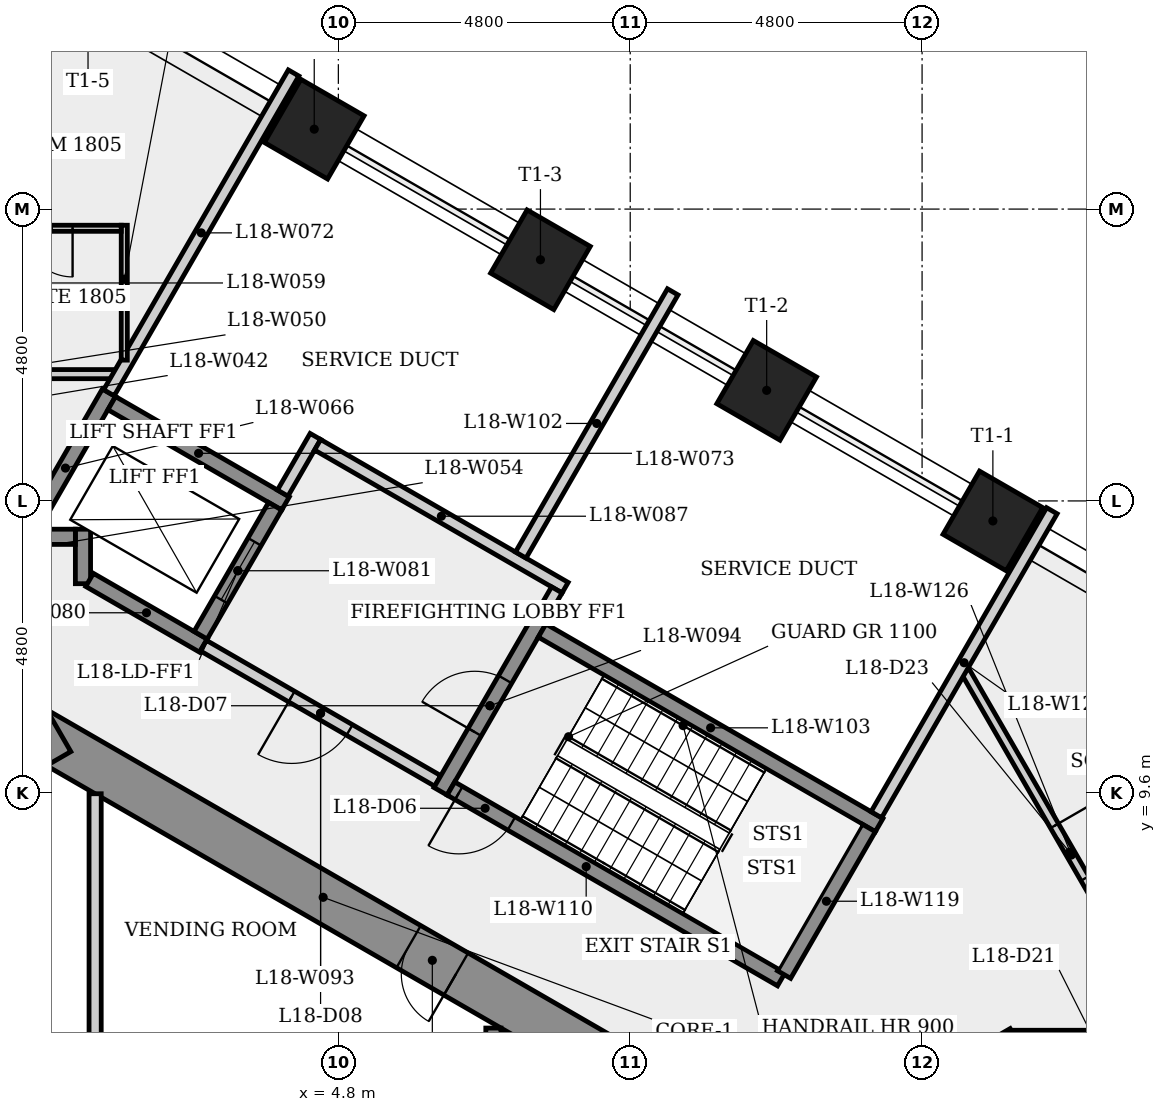
"""IFC4 building model, lengths in metres.
Left out: names, types, materials, properties, quantities, classifications, styles, units other than length and angle.
Written with IfcOpenShell. Run it as: python <this file> out.ifc"""

import sys

from ifc_helpers import new_model, si_unit, direction, frame, frame_2d, origin, origin_2d, place, context, subcontext, project, spatial, rectangle, extrude, element, fill, save


model = new_model("IFC4")
c1 = context("Model", 3, precision=1e-05, world=origin(), true_north=direction((0.0, 1.0)))
c2 = subcontext(c1, "Body", "Model", "MODEL_VIEW")
j1 = project(units=[si_unit("LENGTHUNIT", "METRE"), si_unit("PLANEANGLEUNIT", "RADIAN")], contexts=[c1])
p1 = place(None, origin())
s1 = spatial("IfcSite", under=j1, at=p1, CompositionType="ELEMENT")
p2 = place(p1, origin())
s2 = spatial("IfcBuilding", under=s1, at=p2, CompositionType="ELEMENT")
p3 = place(p2, frame((0.0, 0.0, 70.3)))
s3 = spatial("IfcBuildingStorey", under=s2, at=p3, CompositionType="ELEMENT", Elevation=70.3)
p4 = place(p3, frame((9.3, 5.138, 0.0), z_axis=(0.0, 0.0, 1.0), x_axis=(-0.866023993627, 0.500002442456, 0.0)))
e1 = element("IfcWall", 1, at=p4, inside=s3, PredefinedType="SHEAR", context=c2, shape_type="SweptSolid", body=[
    extrude(rectangle(XDim=10.97, YDim=0.8, at=frame_2d((5.485, 0.0))), origin(), (0.0, 0.0, 1.0), 4.0),
])
p5 = place(p4, frame((2.962, 0.0, 0.0)))
e2 = element("IfcOpeningElement", 2, at=p5, cuts=e1, PredefinedType="OPENING", context=c2, shape_type="SweptSolid", body=[
    extrude(rectangle(XDim=0.9, YDim=2.1, at=frame_2d((0.45, 1.05))), frame((0.0, 0.41, 0.0), z_axis=(0.0, -1.0, 0.0), x_axis=(1.0, 0.0, 0.0)), (0.0, 0.0, 1.0), 0.82),
])
p6 = place(p3, frame((0.2, 10.623, 0.0), z_axis=(0.0, 0.0, 1.0), x_axis=(-0.866023993627, -0.500002442456, 0.0)))
e3 = element("IfcWall", 3, at=p6, inside=s3, PredefinedType="SHEAR", context=c2, shape_type="SweptSolid", body=[
    extrude(rectangle(XDim=10.97, YDim=0.8, at=frame_2d((5.485, 0.0))), origin(), (0.0, 0.0, 1.0), 4.0),
])
p7 = place(p6, frame((9.325, 0.0, 0.0)))
e4 = element("IfcOpeningElement", 4, at=p7, cuts=e3, PredefinedType="OPENING", context=c2, shape_type="SweptSolid", body=[
    extrude(rectangle(XDim=0.9, YDim=2.1, at=frame_2d((0.45, 1.05))), frame((0.0, 0.41, 0.0), z_axis=(0.0, -1.0, 0.0), x_axis=(1.0, 0.0, 0.0)), (0.0, 0.0, 1.0), 0.82),
])
p8 = place(p6, frame((2.091, 0.0, 0.0)))
e5 = element("IfcOpeningElement", 5, at=p8, cuts=e3, PredefinedType="OPENING", context=c2, shape_type="SweptSolid", body=[
    extrude(rectangle(XDim=0.9, YDim=2.1, at=frame_2d((0.45, 1.05))), frame((0.0, 0.41, 0.0), z_axis=(0.0, -1.0, 0.0), x_axis=(1.0, 0.0, 0.0)), (0.0, 0.0, 1.0), 0.82),
])
for number, where, z_axis, x_axis in (
    (6, (15.564, 14.071, 0.0), (0.0, 0.0, 1.0), (0.5, 0.866, 0.0)),
    (7, (11.844, 16.219, 0.0), (0.0, 0.0, 1.0), (0.5, 0.866, 0.0)),
    (8, (8.124, 18.366, 0.0), (0.0, 0.0, 1.0), (0.5, 0.866, 0.0)),
    (9, (4.403, 20.514, 0.0), (0.0, 0.0, 1.0), (0.5, 0.866, 0.0)),
):
    element("IfcColumn", number, at=place(p3, frame(where, z_axis=z_axis, x_axis=x_axis)), inside=s3, PredefinedType="COLUMN", context=c2, shape_type="SweptSolid", body=[
        extrude(rectangle(XDim=1.2, YDim=1.2, at=origin_2d()), origin(), (0.0, 0.0, 1.0), 4.0),
    ])
p9 = place(p3, frame((-3.375, 16.485, 0.0), z_axis=(0.0, 0.0, 1.0), x_axis=(1.0, 0.0, 0.0)))
e10 = element("IfcWall", 10, at=p9, inside=s3, PredefinedType="PARTITIONING", context=c2, shape_type="SweptSolid", body=[
    extrude(rectangle(XDim=4.479, YDim=0.15, at=frame_2d((2.24, 0.0))), origin(), (0.0, 0.0, 1.0), 3.6),
])
p10 = place(p9, frame((0.8, 0.0, 0.0)))
e11 = element("IfcOpeningElement", 11, at=p10, cuts=e10, PredefinedType="OPENING", context=c2, shape_type="SweptSolid", body=[
    extrude(rectangle(XDim=0.9, YDim=2.1, at=frame_2d((0.45, 1.05))), frame((0.0, 0.085, 0.0), z_axis=(0.0, -1.0, 0.0), x_axis=(1.0, 0.0, 0.0)), (0.0, 0.0, 1.0), 0.17),
])
p11 = place(p3, frame((-0.403, 13.702, 0.0), z_axis=(0.0, 0.0, 1.0), x_axis=(0.499976111731, 0.866039195244, 0.0)))
e12 = element("IfcWall", 12, at=p11, inside=s3, PredefinedType="SHEAR", context=c2, shape_type="SweptSolid", body=[
    extrude(rectangle(XDim=2.861, YDim=0.25, at=frame_2d((1.43, 0.0))), origin(), (0.0, 0.0, 1.0), 3.6),
])
p12 = place(p3, frame((0.6, 13.039, 0.0), z_axis=(0.0, 0.0, 1.0), x_axis=(0.0, 1.0, 0.0)))
e13 = element("IfcWall", 13, at=p12, inside=s3, PredefinedType="SHEAR", context=c2, shape_type="SweptSolid", body=[
    extrude(rectangle(XDim=0.896, YDim=0.25, at=frame_2d((0.448, 0.0))), origin(), (0.0, 0.0, 1.0), 3.6),
])
p13 = place(p3, frame((0.475, 13.81, 0.0), z_axis=(0.0, 0.0, 1.0), x_axis=(-1.0, 0.0, 0.0)))
e14 = element("IfcWall", 14, at=p13, inside=s3, PredefinedType="SHEAR", context=c2, shape_type="SweptSolid", body=[
    extrude(rectangle(XDim=0.691, YDim=0.25, at=frame_2d((0.345, 0.0))), origin(), (0.0, 0.0, 1.0), 4.0),
])
p14 = place(p3, frame((0.8, 9.584, 0.0), z_axis=(0.0, 0.0, 1.0), x_axis=(0.0, -1.0, 0.0)))
e15 = element("IfcWall", 15, at=p14, inside=s3, PredefinedType="PARTITIONING", context=c2, shape_type="SweptSolid", body=[
    extrude(rectangle(XDim=4.309, YDim=0.2, at=frame_2d((2.155, 0.0))), origin(), (0.0, 0.0, 1.0), 3.6),
])
p15 = place(p3, frame((1.027, 16.179, 0.0), z_axis=(0.0, 0.0, 1.0), x_axis=(0.49999965181, 0.866025604812, 0.0)))
e16 = element("IfcWall", 16, at=p15, inside=s3, PredefinedType="PLUMBINGWALL", context=c2, shape_type="SweptSolid", body=[
    extrude(rectangle(XDim=6.074, YDim=0.2, at=frame_2d((3.037, 0.0))), origin(), (0.0, 0.0, 1.0), 3.6),
])
p16 = place(p3, frame((1.073, 16.008, 0.0), z_axis=(0.0, 0.0, 1.0), x_axis=(0.866040211805, -0.499974350878, 0.0)))
e17 = element("IfcWall", 17, at=p16, inside=s3, PredefinedType="SHEAR", context=c2, shape_type="SweptSolid", body=[
    extrude(rectangle(XDim=3.3, YDim=0.25, at=frame_2d((1.65, 0.0))), origin(), (0.0, 0.0, 1.0), 3.6),
])
p17 = place(p3, frame((1.279, 16.716, 0.0), z_axis=(0.0, 0.0, 1.0), x_axis=(0.0, 1.0, 0.0)))
e18 = element("IfcWall", 18, at=p17, inside=s3, PredefinedType="PARTITIONING", context=c2, shape_type="SweptSolid", body=[
    extrude(rectangle(XDim=2.219, YDim=0.1, at=frame_2d((1.109, 0.0))), origin(), (0.0, 0.0, 1.0), 3.6),
])
p18 = place(p3, frame((1.229, 18.885, 0.0), z_axis=(0.0, 0.0, 1.0), x_axis=(-1.0, 0.0, 0.0)))
e19 = element("IfcWall", 19, at=p18, inside=s3, PredefinedType="PARTITIONING", context=c2, shape_type="SweptSolid", body=[
    extrude(rectangle(XDim=2.4, YDim=0.1, at=frame_2d((1.2, 0.0))), origin(), (0.0, 0.0, 1.0), 3.6),
])
p19 = place(p18, frame((0.8, 0.0, 0.0)))
e20 = element("IfcOpeningElement", 20, at=p19, cuts=e19, PredefinedType="OPENING", context=c2, shape_type="SweptSolid", body=[
    extrude(rectangle(XDim=0.8, YDim=2.1, at=frame_2d((0.4, 1.05))), frame((0.0, 0.06, 0.0), z_axis=(0.0, -1.0, 0.0), x_axis=(1.0, 0.0, 0.0)), (0.0, 0.0, 1.0), 0.12),
])
p20 = place(p3, frame((2.581, 12.02, 0.0), z_axis=(0.0, 0.0, 1.0), x_axis=(-0.86603892542, 0.499976579108, 0.0)))
e21 = element("IfcWall", 21, at=p20, inside=s3, PredefinedType="SHEAR", context=c2, shape_type="SweptSolid", body=[
    extrude(rectangle(XDim=2.162, YDim=0.25, at=frame_2d((1.081, 0.0))), origin(), (0.0, 0.0, 1.0), 3.6),
])
p21 = place(p3, frame((2.535, 12.191, 0.0), z_axis=(0.0, 0.0, 1.0), x_axis=(0.500061746146, 0.865989751695, 0.0)))
e22 = element("IfcWall", 22, at=p21, inside=s3, PredefinedType="SHEAR", context=c2, shape_type="SweptSolid", body=[
    extrude(rectangle(XDim=2.45, YDim=0.25, at=frame_2d((1.225, 0.0))), origin(), (0.0, 0.0, 1.0), 4.0),
])
p22 = place(p21, frame((0.675, 0.0, 0.0)))
e23 = element("IfcOpeningElement", 23, at=p22, cuts=e22, PredefinedType="OPENING", context=c2, shape_type="SweptSolid", body=[
    extrude(rectangle(XDim=1.1, YDim=2.1, at=frame_2d((0.55, 1.05))), frame((0.0, 0.135, 0.0), z_axis=(0.0, -1.0, 0.0), x_axis=(1.0, 0.0, 0.0)), (0.0, 0.0, 1.0), 0.27),
])
p23 = place(p3, frame((3.885, 14.529, 0.0), z_axis=(0.0, 0.0, 1.0), x_axis=(0.499997628298, 0.866026773083, 0.0)))
e24 = element("IfcWall", 24, at=p23, inside=s3, PredefinedType="PLUMBINGWALL", context=c2, shape_type="SweptSolid", body=[
    extrude(rectangle(XDim=1.075, YDim=0.2, at=frame_2d((0.538, 0.0))), origin(), (0.0, 0.0, 1.0), 3.6),
])
p24 = place(p3, frame((4.459, 15.323, 0.0), z_axis=(0.0, 0.0, 1.0), x_axis=(0.866016039709, -0.500016218704, 0.0)))
e25 = element("IfcWall", 25, at=p24, inside=s3, PredefinedType="PLUMBINGWALL", context=c2, shape_type="SweptSolid", body=[
    extrude(rectangle(XDim=4.7, YDim=0.2, at=frame_2d((2.35, 0.0))), origin(), (0.0, 0.0, 1.0), 3.6),
])
p25 = place(p3, frame((6.435, 9.795, 0.0), z_axis=(0.0, 0.0, 1.0), x_axis=(-0.866012907634, 0.500021643343, 0.0)))
e26 = element("IfcWall", 26, at=p25, inside=s3, PredefinedType="PARTITIONING", context=c2, shape_type="SweptSolid", body=[
    extrude(rectangle(XDim=4.45, YDim=0.2, at=frame_2d((2.225, 0.0))), origin(), (0.0, 0.0, 1.0), 3.6),
])
p26 = place(p25, frame((1.675, 0.0, 0.0)))
e27 = element("IfcOpeningElement", 27, at=p26, cuts=e26, PredefinedType="OPENING", context=c2, shape_type="SweptSolid", body=[
    extrude(rectangle(XDim=1.1, YDim=2.1, at=frame_2d((0.55, 1.05))), frame((0.0, 0.11, 0.0), z_axis=(0.0, -1.0, 0.0), x_axis=(1.0, 0.0, 0.0)), (0.0, 0.0, 1.0), 0.22),
])
p27 = place(p3, frame((6.48, 9.624, 0.0), z_axis=(0.0, 0.0, 1.0), x_axis=(0.500017246033, 0.866015446554, 0.0)))
e28 = element("IfcWall", 28, at=p27, inside=s3, PredefinedType="SHEAR", context=c2, shape_type="SweptSolid", body=[
    extrude(rectangle(XDim=3.25, YDim=0.25, at=frame_2d((1.625, 0.0))), origin(), (0.0, 0.0, 1.0), 3.6),
])
p28 = place(p27, frame((1.125, 0.0, 0.0)))
e29 = element("IfcOpeningElement", 29, at=p28, cuts=e28, PredefinedType="OPENING", context=c2, shape_type="SweptSolid", body=[
    extrude(rectangle(XDim=1.0, YDim=2.1, at=frame_2d((0.5, 1.05))), frame((0.0, 0.135, 0.0), z_axis=(0.0, -1.0, 0.0), x_axis=(1.0, 0.0, 0.0)), (0.0, 0.0, 1.0), 0.27),
])
p29 = place(p3, frame((7.35, 5.73, 0.0), z_axis=(0.0, 0.0, 1.0), x_axis=(0.0, -1.0, 0.0)))
e30 = element("IfcWall", 30, at=p29, inside=s3, PredefinedType="SHEAR", context=c2, shape_type="SweptSolid", body=[
    extrude(rectangle(XDim=3.805, YDim=0.25, at=frame_2d((1.903, 0.0))), origin(), (0.0, 0.0, 1.0), 3.6),
])
p30 = place(p3, frame((7.8, 13.51, 0.0), z_axis=(0.0, 0.0, 1.0), x_axis=(0.500000087074, 0.866025353512, 0.0)))
e31 = element("IfcWall", 31, at=p30, inside=s3, PredefinedType="PLUMBINGWALL", context=c2, shape_type="SweptSolid", body=[
    extrude(rectangle(XDim=4.999, YDim=0.2, at=frame_2d((2.499, 0.0))), origin(), (0.0, 0.0, 1.0), 3.6),
])
p31 = place(p3, frame((8.151, 12.268, 0.0), z_axis=(0.0, 0.0, 1.0), x_axis=(0.866025499775, -0.499999833739, 0.0)))
e32 = element("IfcWall", 32, at=p31, inside=s3, PredefinedType="SHEAR", context=c2, shape_type="SweptSolid", body=[
    extrude(rectangle(XDim=6.4, YDim=0.25, at=frame_2d((3.2, 0.0))), origin(), (0.0, 0.0, 1.0), 3.6),
])
p32 = place(p3, frame((8.393, 12.937, 0.0), z_axis=(0.0, 0.0, 1.0), x_axis=(-0.500065409566, -0.86598763626, 0.0)))
e33 = element("IfcWall", 33, at=p32, inside=s3, PredefinedType="PLUMBINGWALL", context=c2, shape_type="SweptSolid", body=[
    extrude(rectangle(XDim=0.575, YDim=0.2, at=frame_2d((0.288, 0.0))), origin(), (0.0, 0.0, 1.0), 3.6),
])
p33 = place(p3, frame((11.1, 7.101, 0.0), z_axis=(0.0, 0.0, 1.0), x_axis=(-0.8660265141, 0.499998076872, 0.0)))
e34 = element("IfcWall", 34, at=p33, inside=s3, PredefinedType="SHEAR", context=c2, shape_type="SweptSolid", body=[
    extrude(rectangle(XDim=5.137, YDim=0.25, at=frame_2d((2.569, 0.0))), origin(), (0.0, 0.0, 1.0), 3.6),
])
p34 = place(p33, frame((3.987, 0.0, 0.0)))
e35 = element("IfcOpeningElement", 35, at=p34, cuts=e34, PredefinedType="OPENING", context=c2, shape_type="SweptSolid", body=[
    extrude(rectangle(XDim=1.0, YDim=2.1, at=frame_2d((0.5, 1.05))), frame((0.0, 0.135, 0.0), z_axis=(0.0, -1.0, 0.0), x_axis=(1.0, 0.0, 0.0)), (0.0, 0.0, 1.0), 0.27),
])
p35 = place(p3, frame((12.085, 6.532, 0.0), z_axis=(0.0, 0.0, 1.0), x_axis=(-0.86604373436, 0.499968249168, 0.0)))
e36 = element("IfcWall", 36, at=p35, inside=s3, PredefinedType="SHEAR", context=c2, shape_type="SweptSolid", body=[
    extrude(rectangle(XDim=1.118, YDim=0.25, at=frame_2d((0.559, 0.0))), origin(), (0.0, 0.0, 1.0), 3.6),
])
p36 = place(p3, frame((13.523, 9.022, 0.0), z_axis=(0.0, 0.0, 1.0), x_axis=(-0.500013277472, -0.866017737897, 0.0)))
e37 = element("IfcWall", 37, at=p36, inside=s3, PredefinedType="SHEAR", context=c2, shape_type="SweptSolid", body=[
    extrude(rectangle(XDim=2.786, YDim=0.25, at=frame_2d((1.393, 0.0))), origin(), (0.0, 0.0, 1.0), 3.6),
])
p37 = place(p3, frame((15.11, 11.598, 0.0), z_axis=(0.0, 0.0, 1.0), x_axis=(0.499976825411, -0.866038783226, 0.0)))
e38 = element("IfcWall", 38, at=p37, inside=s3, PredefinedType="PARTITIONING", context=c2, shape_type="SweptSolid", body=[
    extrude(rectangle(XDim=6.979, YDim=0.15, at=frame_2d((3.489, 0.0))), origin(), (0.0, 0.0, 1.0), 3.6),
])
p38 = place(p37, frame((2.935, 0.0, 0.0)))
e39 = element("IfcOpeningElement", 39, at=p38, cuts=e38, PredefinedType="OPENING", context=c2, shape_type="SweptSolid", body=[
    extrude(rectangle(XDim=1.0, YDim=2.1, at=frame_2d((0.5, 1.05))), frame((0.0, 0.085, 0.0), z_axis=(0.0, -1.0, 0.0), x_axis=(1.0, 0.0, 0.0)), (0.0, 0.0, 1.0), 0.17),
])
p39 = place(p3, frame((13.648, 9.239, 0.0), z_axis=(0.0, 0.0, 1.0), x_axis=(0.499977455708, 0.866038419346, 0.0)))
e40 = element("IfcWall", 40, at=p39, inside=s3, PredefinedType="PLUMBINGWALL", context=c2, shape_type="SweptSolid", body=[
    extrude(rectangle(XDim=5.774, YDim=0.2, at=frame_2d((2.887, 0.0))), origin(), (0.0, 0.0, 1.0), 3.6),
])
p40 = place(p3, frame((15.784, 5.684, 0.0), z_axis=(0.0, 0.0, 1.0), x_axis=(0.49987468637, -0.866097741555, 0.0)))
e41 = element("IfcWall", 41, at=p40, inside=s3, PredefinedType="PARTITIONING", context=c2, shape_type="SweptSolid", body=[
    extrude(rectangle(XDim=0.555, YDim=0.15, at=frame_2d((0.278, 0.0))), origin(), (0.0, 0.0, 1.0), 3.6),
])
p41 = place(p3, frame((18.487, 5.619, 0.0), z_axis=(0.0, 0.0, 1.0), x_axis=(-1.0, 0.0, 0.0)))
e42 = element("IfcWall", 42, at=p41, inside=s3, PredefinedType="PARTITIONING", context=c2, shape_type="SweptSolid", body=[
    extrude(rectangle(XDim=2.591, YDim=0.15, at=frame_2d((1.295, 0.0))), origin(), (0.0, 0.0, 1.0), 3.6),
])
p42 = place(p41, frame((0.845, 0.0, 0.0)))
e43 = element("IfcOpeningElement", 43, at=p42, cuts=e42, PredefinedType="OPENING", context=c2, shape_type="SweptSolid", body=[
    extrude(rectangle(XDim=0.9, YDim=2.1, at=frame_2d((0.45, 1.05))), frame((0.0, 0.085, 0.0), z_axis=(0.0, -1.0, 0.0), x_axis=(1.0, 0.0, 0.0)), (0.0, 0.0, 1.0), 0.17),
])
p43 = place(p34, origin())
e44 = element("IfcDoor", 44, at=p43, inside=s3, OperationType="SINGLE_SWING_RIGHT", PredefinedType="DOOR", context=c2, shape_type="SweptSolid", body=[
    extrude(rectangle(XDim=1.0, YDim=2.1, at=frame_2d((0.5, 1.05))), frame((0.0, 0.025, 0.0), z_axis=(0.0, -1.0, 0.0), x_axis=(1.0, 0.0, 0.0)), (0.0, 0.0, 1.0), 0.05),
])
fill(e35, e44)
p44 = place(p28, origin())
e45 = element("IfcDoor", 45, at=p44, inside=s3, OperationType="SINGLE_SWING_LEFT", PredefinedType="DOOR", context=c2, shape_type="SweptSolid", body=[
    extrude(rectangle(XDim=1.0, YDim=2.1, at=frame_2d((0.5, 1.05))), frame((0.0, 0.025, 0.0), z_axis=(0.0, -1.0, 0.0), x_axis=(1.0, 0.0, 0.0)), (0.0, 0.0, 1.0), 0.05),
])
fill(e29, e45)
p45 = place(p26, origin())
e46 = element("IfcDoor", 46, at=p45, inside=s3, OperationType="SINGLE_SWING_RIGHT", PredefinedType="DOOR", context=c2, shape_type="SweptSolid", body=[
    extrude(rectangle(XDim=1.1, YDim=2.1, at=frame_2d((0.55, 1.05))), frame((0.0, 0.025, 0.0), z_axis=(0.0, -1.0, 0.0), x_axis=(1.0, 0.0, 0.0)), (0.0, 0.0, 1.0), 0.05),
])
fill(e27, e46)
p46 = place(p22, origin())
e47 = element("IfcDoor", 47, at=p46, inside=s3, OperationType="SLIDING_TO_LEFT", PredefinedType="DOOR", context=c2, shape_type="SweptSolid", body=[
    extrude(rectangle(XDim=1.1, YDim=2.1, at=frame_2d((0.55, 1.05))), frame((0.0, 0.025, 0.0), z_axis=(0.0, -1.0, 0.0), x_axis=(1.0, 0.0, 0.0)), (0.0, 0.0, 1.0), 0.05),
])
fill(e23, e47)
p47 = place(p38, origin())
e48 = element("IfcDoor", 48, at=p47, inside=s3, OperationType="SINGLE_SWING_LEFT", PredefinedType="DOOR", context=c2, shape_type="SweptSolid", body=[
    extrude(rectangle(XDim=1.0, YDim=2.1, at=frame_2d((0.5, 1.05))), frame((0.0, 0.025, 0.0), z_axis=(0.0, -1.0, 0.0), x_axis=(1.0, 0.0, 0.0)), (0.0, 0.0, 1.0), 0.05),
])
fill(e39, e48)
p48 = place(p19, origin())
e49 = element("IfcDoor", 49, at=p48, inside=s3, OperationType="SINGLE_SWING_LEFT", PredefinedType="DOOR", context=c2, shape_type="SweptSolid", body=[
    extrude(rectangle(XDim=0.8, YDim=2.1, at=frame_2d((0.4, 1.05))), frame((0.0, 0.025, 0.0), z_axis=(0.0, -1.0, 0.0), x_axis=(1.0, 0.0, 0.0)), (0.0, 0.0, 1.0), 0.05),
])
fill(e20, e49)
p49 = place(p5, origin())
e50 = element("IfcDoor", 50, at=p49, inside=s3, OperationType="SINGLE_SWING_LEFT", PredefinedType="DOOR", context=c2, shape_type="SweptSolid", body=[
    extrude(rectangle(XDim=0.9, YDim=2.1, at=frame_2d((0.45, 1.05))), frame((0.0, 0.025, 0.0), z_axis=(0.0, -1.0, 0.0), x_axis=(1.0, 0.0, 0.0)), (0.0, 0.0, 1.0), 0.05),
])
fill(e2, e50)
save(model, sys.argv[1])
